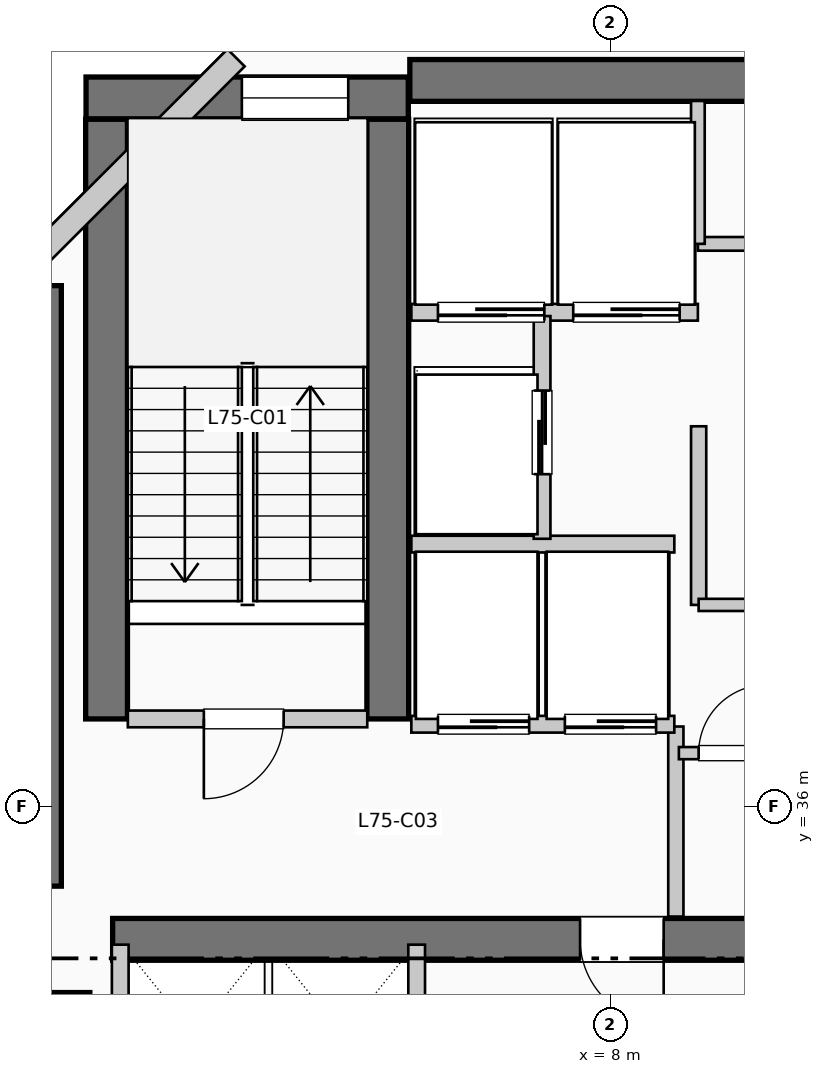
"""IFC4 building model, lengths in metres.
Left out: names, types, materials, properties, quantities, classifications, styles, units other than length and angle.
Written with IfcOpenShell. Run it as: python <this file> out.ifc"""

import sys

from ifc_helpers import new_model, si_unit, direction, frame, frame_2d, origin, origin_2d, place, context, subcontext, project, spatial, rectangle, extrude, element, fill, save


model = new_model("IFC4")
c1 = context("Model", 3, precision=1e-05, world=origin(), true_north=direction((0.0, 1.0)))
c2 = subcontext(c1, "Body", "Model", "MODEL_VIEW")
j1 = project(units=[si_unit("LENGTHUNIT", "METRE"), si_unit("PLANEANGLEUNIT", "RADIAN")], contexts=[c1])
p1 = place(None, origin())
s1 = spatial("IfcSite", under=j1, at=p1, CompositionType="ELEMENT")
p2 = place(p1, origin())
s2 = spatial("IfcBuilding", under=s1, at=p2, CompositionType="ELEMENT")
p3 = place(p2, frame((0.0, 0.0, 307.89)))
s3 = spatial("IfcBuildingStorey", under=s2, at=p3, CompositionType="ELEMENT", Elevation=307.89)
p4 = place(p3, frame((5.36, 45.55, 0.0), z_axis=(0.0, 0.0, 1.0), x_axis=(1.0, 0.0, 0.0)))
e1 = element("IfcWall", 1, at=p4, inside=s3, PredefinedType="SHEAR", context=c2, shape_type="SweptSolid", body=[
    extrude(rectangle(XDim=13.98, YDim=0.55, at=frame_2d((6.99, 0.0))), origin(), (0.0, 0.0, 1.0), 3.96),
])
p5 = place(p3, frame((0.5, 34.95, 0.0), z_axis=(0.0, 0.0, 1.0), x_axis=(0.0, 1.0, 0.0)))
e2 = element("IfcWall", 2, at=p5, inside=s3, PredefinedType="SHEAR", context=c2, shape_type="SweptSolid", body=[
    extrude(rectangle(XDim=7.9, YDim=0.55, at=frame_2d((3.95, 0.0))), origin(), (0.0, 0.0, 1.0), 3.96),
])
p6 = place(p3, frame((1.45, 34.25, 0.0), z_axis=(0.0, 0.0, 1.0), x_axis=(1.0, 0.0, 0.0)))
e3 = element("IfcWall", 3, at=p6, inside=s3, PredefinedType="SHEAR", context=c2, shape_type="SweptSolid", body=[
    extrude(rectangle(XDim=10.71, YDim=0.55, at=frame_2d((5.355, 0.0))), origin(), (0.0, 0.0, 1.0), 3.96),
])
p7 = place(p6, frame((7.25, 0.0, 0.0), z_axis=(0.0, 0.0, 1.0), x_axis=(-1.0, 0.0, 0.0)))
e4 = element("IfcOpeningElement", 4, at=p7, cuts=e3, PredefinedType="OPENING", context=c2, shape_type="SweptSolid", body=[
    extrude(rectangle(XDim=1.1, YDim=2.15, at=frame_2d((0.55, 1.075))), frame((0.0, 0.285, 0.0), z_axis=(0.0, -1.0, 0.0), x_axis=(1.0, 0.0, 0.0)), (0.0, 0.0, 1.0), 0.57),
])
for number, where, z_axis, x_axis in (
    (5, (1.37, 37.15, 0.0), (0.0, 0.0, 1.0), (0.0, 1.0, 0.0)),
    (6, (5.07, 37.15, 0.0), (0.0, 0.0, 1.0), (0.0, 1.0, 0.0)),
):
    element("IfcWall", number, at=place(p3, frame(where, z_axis=z_axis, x_axis=x_axis)), inside=s3, PredefinedType="SHEAR", context=c2, shape_type="SweptSolid", body=[
        extrude(rectangle(XDim=7.89, YDim=0.55, at=frame_2d((3.945, 0.0))), origin(), (0.0, 0.0, 1.0), 3.96),
    ])
p8 = place(p3, frame((1.1, 45.32, 0.0), z_axis=(0.0, 0.0, 1.0), x_axis=(1.0, 0.0, 0.0)))
e7 = element("IfcWall", 7, at=p8, inside=s3, PredefinedType="SHEAR", context=c2, shape_type="SweptSolid", body=[
    extrude(rectangle(XDim=4.24, YDim=0.55, at=frame_2d((2.12, 0.0))), origin(), (0.0, 0.0, 1.0), 3.96),
])
p9 = place(p8, frame((2.05, 0.0, 1.05)))
e8 = element("IfcOpeningElement", 8, at=p9, cuts=e7, PredefinedType="OPENING", context=c2, shape_type="SweptSolid", body=[
    extrude(rectangle(XDim=1.4, YDim=1.8, at=frame_2d((0.7, 0.9))), frame((0.0, 0.285, 0.0), z_axis=(0.0, -1.0, 0.0), x_axis=(1.0, 0.0, 0.0)), (0.0, 0.0, 1.0), 0.57),
])
p10 = place(p3, frame((0.8, 33.2, 0.0), z_axis=(0.0, 0.0, 1.0), x_axis=(1.0, 0.0, 0.0)))
e9 = element("IfcColumn", 9, at=p10, inside=s3, PredefinedType="COLUMN", context=c2, shape_type="SweptSolid", body=[
    extrude(rectangle(XDim=0.7, YDim=0.7, at=origin_2d()), origin(), (0.0, 0.0, 1.0), 3.96),
])
p11 = place(p3, frame((3.074, 45.848, 0.0), z_axis=(0.0, 0.0, 1.0), x_axis=(-0.707106781187, -0.707106781187, 0.0)))
e10 = element("IfcWall", 10, at=p11, inside=s3, PredefinedType="SOLIDWALL", context=c2, shape_type="SweptSolid", body=[
    extrude(rectangle(XDim=4.133, YDim=0.32, at=frame_2d((2.066, 0.0))), origin(), (0.0, 0.0, 1.0), 3.74),
])
p12 = place(p3, frame((1.65, 37.15, 0.0), z_axis=(0.0, 0.0, 1.0), x_axis=(1.0, 0.0, 0.0)))
e11 = element("IfcWall", 11, at=p12, inside=s3, PredefinedType="PARTITIONING", context=c2, shape_type="SweptSolid", body=[
    extrude(rectangle(XDim=3.15, YDim=0.22, at=frame_2d((1.575, 0.0))), origin(), (0.0, 0.0, 1.0), 3.74),
])
p13 = place(p12, frame((2.05, 0.0, 0.0), z_axis=(0.0, 0.0, 1.0), x_axis=(-1.0, 0.0, 0.0)))
e12 = element("IfcOpeningElement", 12, at=p13, cuts=e11, PredefinedType="OPENING", context=c2, shape_type="SweptSolid", body=[
    extrude(rectangle(XDim=1.05, YDim=2.15, at=frame_2d((0.525, 1.075))), frame((0.0, 0.12, 0.0), z_axis=(0.0, -1.0, 0.0), x_axis=(1.0, 0.0, 0.0)), (0.0, 0.0, 1.0), 0.24),
])
p14 = place(p3, frame((8.86, 34.55, 0.0), z_axis=(0.0, 0.0, 1.0), x_axis=(0.0, 1.0, 0.0)))
e13 = element("IfcWall", 13, at=p14, inside=s3, PredefinedType="PARTITIONING", context=c2, shape_type="SweptSolid", body=[
    extrude(rectangle(XDim=2.5, YDim=0.2, at=frame_2d((1.25, 0.0))), origin(), (0.0, 0.0, 1.0), 3.74),
])
p15 = place(p3, frame((5.38, 37.08, 0.0), z_axis=(0.0, 0.0, 1.0), x_axis=(1.0, 0.0, 0.0)))
e14 = element("IfcWall", 14, at=p15, inside=s3, PredefinedType="PARTITIONING", context=c2, shape_type="SweptSolid", body=[
    extrude(rectangle(XDim=3.46, YDim=0.22, at=frame_2d((1.73, 0.0))), origin(), (0.0, 0.0, 1.0), 3.74),
])
p16 = place(p15, frame((1.55, 0.0, 0.0), z_axis=(0.0, 0.0, 1.0), x_axis=(-1.0, 0.0, 0.0)))
e15 = element("IfcOpeningElement", 15, at=p16, cuts=e14, PredefinedType="OPENING", context=c2, shape_type="SweptSolid", body=[
    extrude(rectangle(XDim=1.2, YDim=2.2, at=frame_2d((0.6, 1.1))), frame((0.0, 0.12, 0.0), z_axis=(0.0, -1.0, 0.0), x_axis=(1.0, 0.0, 0.0)), (0.0, 0.0, 1.0), 0.24),
])
p17 = place(p15, frame((3.22, 0.0, 0.0), z_axis=(0.0, 0.0, 1.0), x_axis=(-1.0, 0.0, 0.0)))
e16 = element("IfcOpeningElement", 16, at=p17, cuts=e14, PredefinedType="OPENING", context=c2, shape_type="SweptSolid", body=[
    extrude(rectangle(XDim=1.2, YDim=2.2, at=frame_2d((0.6, 1.1))), frame((0.0, 0.12, 0.0), z_axis=(0.0, -1.0, 0.0), x_axis=(1.0, 0.0, 0.0)), (0.0, 0.0, 1.0), 0.24),
])
p18 = place(p3, frame((5.38, 39.45, 0.0), z_axis=(0.0, 0.0, 1.0), x_axis=(1.0, 0.0, 0.0)))
e17 = element("IfcWall", 17, at=p18, inside=s3, PredefinedType="PARTITIONING", context=c2, shape_type="SweptSolid", body=[
    extrude(rectangle(XDim=3.46, YDim=0.22, at=frame_2d((1.73, 0.0))), origin(), (0.0, 0.0, 1.0), 3.74),
])
p19 = place(p3, frame((5.38, 42.5, 0.0), z_axis=(0.0, 0.0, 1.0), x_axis=(1.0, 0.0, 0.0)))
e18 = element("IfcWall", 18, at=p19, inside=s3, PredefinedType="PARTITIONING", context=c2, shape_type="SweptSolid", body=[
    extrude(rectangle(XDim=3.77, YDim=0.22, at=frame_2d((1.885, 0.0))), origin(), (0.0, 0.0, 1.0), 3.74),
])
p20 = place(p19, frame((1.75, 0.0, 0.0), z_axis=(0.0, 0.0, 1.0), x_axis=(-1.0, 0.0, 0.0)))
e19 = element("IfcOpeningElement", 19, at=p20, cuts=e18, PredefinedType="OPENING", context=c2, shape_type="SweptSolid", body=[
    extrude(rectangle(XDim=1.4, YDim=2.2, at=frame_2d((0.7, 1.1))), frame((0.0, 0.12, 0.0), z_axis=(0.0, -1.0, 0.0), x_axis=(1.0, 0.0, 0.0)), (0.0, 0.0, 1.0), 0.24),
])
p21 = place(p19, frame((3.53, 0.0, 0.0), z_axis=(0.0, 0.0, 1.0), x_axis=(-1.0, 0.0, 0.0)))
e20 = element("IfcOpeningElement", 20, at=p21, cuts=e18, PredefinedType="OPENING", context=c2, shape_type="SweptSolid", body=[
    extrude(rectangle(XDim=1.4, YDim=2.2, at=frame_2d((0.7, 1.1))), frame((0.0, 0.12, 0.0), z_axis=(0.0, -1.0, 0.0), x_axis=(1.0, 0.0, 0.0)), (0.0, 0.0, 1.0), 0.24),
])
p22 = place(p3, frame((7.1, 39.52, 0.0), z_axis=(0.0, 0.0, 1.0), x_axis=(0.0, 1.0, 0.0)))
e21 = element("IfcWall", 21, at=p22, inside=s3, PredefinedType="PARTITIONING", context=c2, shape_type="SweptSolid", body=[
    extrude(rectangle(XDim=2.93, YDim=0.22, at=frame_2d((1.465, 0.0))), origin(), (0.0, 0.0, 1.0), 3.74),
])
p23 = place(p22, frame((0.85, 0.0, 0.0)))
e22 = element("IfcOpeningElement", 22, at=p23, cuts=e21, PredefinedType="OPENING", context=c2, shape_type="SweptSolid", body=[
    extrude(rectangle(XDim=1.1, YDim=2.2, at=frame_2d((0.55, 1.1))), frame((0.0, 0.12, 0.0), z_axis=(0.0, -1.0, 0.0), x_axis=(1.0, 0.0, 0.0)), (0.0, 0.0, 1.0), 0.24),
])
for number, where, z_axis, x_axis in (
    (23, (1.55, 31.8, 0.0), (0.0, 0.0, 1.0), (0.0, 1.0, 0.0)),
    (24, (5.45, 31.8, 0.0), (0.0, 0.0, 1.0), (0.0, 1.0, 0.0)),
):
    element("IfcWall", number, at=place(p3, frame(where, z_axis=z_axis, x_axis=x_axis)), inside=s3, PredefinedType="PARTITIONING", context=c2, shape_type="SweptSolid", body=[
        extrude(rectangle(XDim=2.38, YDim=0.22, at=frame_2d((1.19, 0.0))), origin(), (0.0, 0.0, 1.0), 3.74),
    ])
p24 = place(p3, frame((9.16, 38.65, 0.0), z_axis=(0.0, 0.0, 1.0), x_axis=(0.0, 1.0, 0.0)))
e25 = element("IfcWall", 25, at=p24, inside=s3, PredefinedType="PARTITIONING", context=c2, shape_type="SweptSolid", body=[
    extrude(rectangle(XDim=2.35, YDim=0.2, at=frame_2d((1.175, 0.0))), origin(), (0.0, 0.0, 1.0), 3.74),
])
p25 = place(p3, frame((8.9, 36.7, 0.0), z_axis=(0.0, 0.0, 1.0), x_axis=(1.0, 0.0, 0.0)))
e26 = element("IfcWall", 26, at=p25, inside=s3, PredefinedType="PARTITIONING", context=c2, shape_type="SweptSolid", body=[
    extrude(rectangle(XDim=3.25, YDim=0.16, at=frame_2d((1.625, 0.0))), origin(), (0.0, 0.0, 1.0), 3.74),
])
p26 = place(p25, frame((0.26, 0.0, 0.0)))
e27 = element("IfcOpeningElement", 27, at=p26, cuts=e26, PredefinedType="OPENING", context=c2, shape_type="SweptSolid", body=[
    extrude(rectangle(XDim=0.9, YDim=2.15, at=frame_2d((0.45, 1.075))), frame((0.0, 0.09, 0.0), z_axis=(0.0, -1.0, 0.0), x_axis=(1.0, 0.0, 0.0)), (0.0, 0.0, 1.0), 0.18),
])
p27 = place(p25, frame((1.68, 0.0, 0.0)))
e28 = element("IfcOpeningElement", 28, at=p27, cuts=e26, PredefinedType="OPENING", context=c2, shape_type="SweptSolid", body=[
    extrude(rectangle(XDim=0.9, YDim=2.15, at=frame_2d((0.45, 1.075))), frame((0.0, 0.09, 0.0), z_axis=(0.0, -1.0, 0.0), x_axis=(1.0, 0.0, 0.0)), (0.0, 0.0, 1.0), 0.18),
])
p28 = place(p3, frame((9.16, 38.65, 0.0), z_axis=(0.0, 0.0, 1.0), x_axis=(1.0, 0.0, 0.0)))
e29 = element("IfcWall", 29, at=p28, inside=s3, PredefinedType="PARTITIONING", context=c2, shape_type="SweptSolid", body=[
    extrude(rectangle(XDim=3.42, YDim=0.16, at=frame_2d((1.71, 0.0))), origin(), (0.0, 0.0, 1.0), 3.74),
])
p29 = place(p28, frame((2.15, 0.0, 0.0), z_axis=(0.0, 0.0, 1.0), x_axis=(-1.0, 0.0, 0.0)))
e30 = element("IfcOpeningElement", 30, at=p29, cuts=e29, PredefinedType="OPENING", context=c2, shape_type="SweptSolid", body=[
    extrude(rectangle(XDim=0.95, YDim=2.15, at=frame_2d((0.475, 1.075))), frame((0.0, 0.09, 0.0), z_axis=(0.0, -1.0, 0.0), x_axis=(1.0, 0.0, 0.0)), (0.0, 0.0, 1.0), 0.18),
])
p30 = place(p3, frame((9.15, 43.4, 0.0), z_axis=(0.0, 0.0, 1.0), x_axis=(1.0, 0.0, 0.0)))
e31 = element("IfcWall", 31, at=p30, inside=s3, PredefinedType="PLUMBINGWALL", context=c2, shape_type="SweptSolid", body=[
    extrude(rectangle(XDim=9.33, YDim=0.18, at=frame_2d((4.665, 0.0))), origin(), (0.0, 0.0, 1.0), 3.74),
])
p31 = place(p30, frame((1.88, 0.0, 0.0)))
e32 = element("IfcOpeningElement", 32, at=p31, cuts=e31, PredefinedType="OPENING", context=c2, shape_type="SweptSolid", body=[
    extrude(rectangle(XDim=0.92, YDim=2.1, at=frame_2d((0.46, 1.05))), frame((0.0, 0.1, 0.0), z_axis=(0.0, -1.0, 0.0), x_axis=(1.0, 0.0, 0.0)), (0.0, 0.0, 1.0), 0.2),
])
p32 = place(p30, frame((6.515, 0.0, 0.0)))
e33 = element("IfcOpeningElement", 33, at=p32, cuts=e31, PredefinedType="OPENING", context=c2, shape_type="SweptSolid", body=[
    extrude(rectangle(XDim=0.92, YDim=2.1, at=frame_2d((0.46, 1.05))), frame((0.0, 0.1, 0.0), z_axis=(0.0, -1.0, 0.0), x_axis=(1.0, 0.0, 0.0)), (0.0, 0.0, 1.0), 0.2),
])
p33 = place(p3, frame((9.15, 43.4, 0.0), z_axis=(0.0, 0.0, 1.0), x_axis=(0.0, 1.0, 0.0)))
e34 = element("IfcWall", 34, at=p33, inside=s3, PredefinedType="PLUMBINGWALL", context=c2, shape_type="SweptSolid", body=[
    extrude(rectangle(XDim=1.88, YDim=0.18, at=frame_2d((0.94, 0.0))), origin(), (0.0, 0.0, 1.0), 3.74),
])
p34 = place(p9, origin())
e35 = element("IfcWindow", 35, at=p34, inside=s3, PartitioningType="SINGLE_PANEL", PredefinedType="WINDOW", context=c2, shape_type="SweptSolid", body=[
    extrude(rectangle(XDim=1.4, YDim=1.8, at=frame_2d((0.7, 0.9))), frame((0.0, 0.03, 0.0), z_axis=(0.0, -1.0, 0.0), x_axis=(1.0, 0.0, 0.0)), (0.0, 0.0, 1.0), 0.06),
])
fill(e8, e35)
p35 = place(p13, origin())
e36 = element("IfcDoor", 36, at=p35, inside=s3, OperationType="SINGLE_SWING_LEFT", PredefinedType="DOOR", context=c2, shape_type="SweptSolid", body=[
    extrude(rectangle(XDim=1.05, YDim=2.15, at=frame_2d((0.525, 1.075))), frame((0.0, 0.025, 0.0), z_axis=(0.0, -1.0, 0.0), x_axis=(1.0, 0.0, 0.0)), (0.0, 0.0, 1.0), 0.05),
])
fill(e12, e36)
p36 = place(p7, origin())
e37 = element("IfcDoor", 37, at=p36, inside=s3, OperationType="SINGLE_SWING_RIGHT", PredefinedType="DOOR", context=c2, shape_type="SweptSolid", body=[
    extrude(rectangle(XDim=1.1, YDim=2.15, at=frame_2d((0.55, 1.075))), frame((0.0, 0.025, 0.0), z_axis=(0.0, -1.0, 0.0), x_axis=(1.0, 0.0, 0.0)), (0.0, 0.0, 1.0), 0.05),
])
fill(e4, e37)
p37 = place(p16, origin())
e38 = element("IfcDoor", 38, at=p37, inside=s3, OperationType="SLIDING_TO_RIGHT", PredefinedType="DOOR", context=c2, shape_type="SweptSolid", body=[
    extrude(rectangle(XDim=1.2, YDim=2.2, at=frame_2d((0.6, 1.1))), frame((0.0, 0.025, 0.0), z_axis=(0.0, -1.0, 0.0), x_axis=(1.0, 0.0, 0.0)), (0.0, 0.0, 1.0), 0.05),
])
fill(e15, e38)
p38 = place(p17, origin())
e39 = element("IfcDoor", 39, at=p38, inside=s3, OperationType="SLIDING_TO_RIGHT", PredefinedType="DOOR", context=c2, shape_type="SweptSolid", body=[
    extrude(rectangle(XDim=1.2, YDim=2.2, at=frame_2d((0.6, 1.1))), frame((0.0, 0.025, 0.0), z_axis=(0.0, -1.0, 0.0), x_axis=(1.0, 0.0, 0.0)), (0.0, 0.0, 1.0), 0.05),
])
fill(e16, e39)
p39 = place(p20, origin())
e40 = element("IfcDoor", 40, at=p39, inside=s3, OperationType="SLIDING_TO_LEFT", PredefinedType="DOOR", context=c2, shape_type="SweptSolid", body=[
    extrude(rectangle(XDim=1.4, YDim=2.2, at=frame_2d((0.7, 1.1))), frame((0.0, 0.025, 0.0), z_axis=(0.0, -1.0, 0.0), x_axis=(1.0, 0.0, 0.0)), (0.0, 0.0, 1.0), 0.05),
])
fill(e19, e40)
p40 = place(p21, origin())
e41 = element("IfcDoor", 41, at=p40, inside=s3, OperationType="SLIDING_TO_LEFT", PredefinedType="DOOR", context=c2, shape_type="SweptSolid", body=[
    extrude(rectangle(XDim=1.4, YDim=2.2, at=frame_2d((0.7, 1.1))), frame((0.0, 0.025, 0.0), z_axis=(0.0, -1.0, 0.0), x_axis=(1.0, 0.0, 0.0)), (0.0, 0.0, 1.0), 0.05),
])
fill(e20, e41)
p41 = place(p23, origin())
e42 = element("IfcDoor", 42, at=p41, inside=s3, OperationType="SLIDING_TO_LEFT", PredefinedType="DOOR", context=c2, shape_type="SweptSolid", body=[
    extrude(rectangle(XDim=1.1, YDim=2.2, at=frame_2d((0.55, 1.1))), frame((0.0, 0.025, 0.0), z_axis=(0.0, -1.0, 0.0), x_axis=(1.0, 0.0, 0.0)), (0.0, 0.0, 1.0), 0.05),
])
fill(e22, e42)
p42 = place(p26, origin())
e43 = element("IfcDoor", 43, at=p42, inside=s3, OperationType="SINGLE_SWING_RIGHT", PredefinedType="DOOR", context=c2, shape_type="SweptSolid", body=[
    extrude(rectangle(XDim=0.9, YDim=2.15, at=frame_2d((0.45, 1.075))), frame((0.0, 0.025, 0.0), z_axis=(0.0, -1.0, 0.0), x_axis=(1.0, 0.0, 0.0)), (0.0, 0.0, 1.0), 0.05),
])
fill(e27, e43)
save(model, sys.argv[1])
